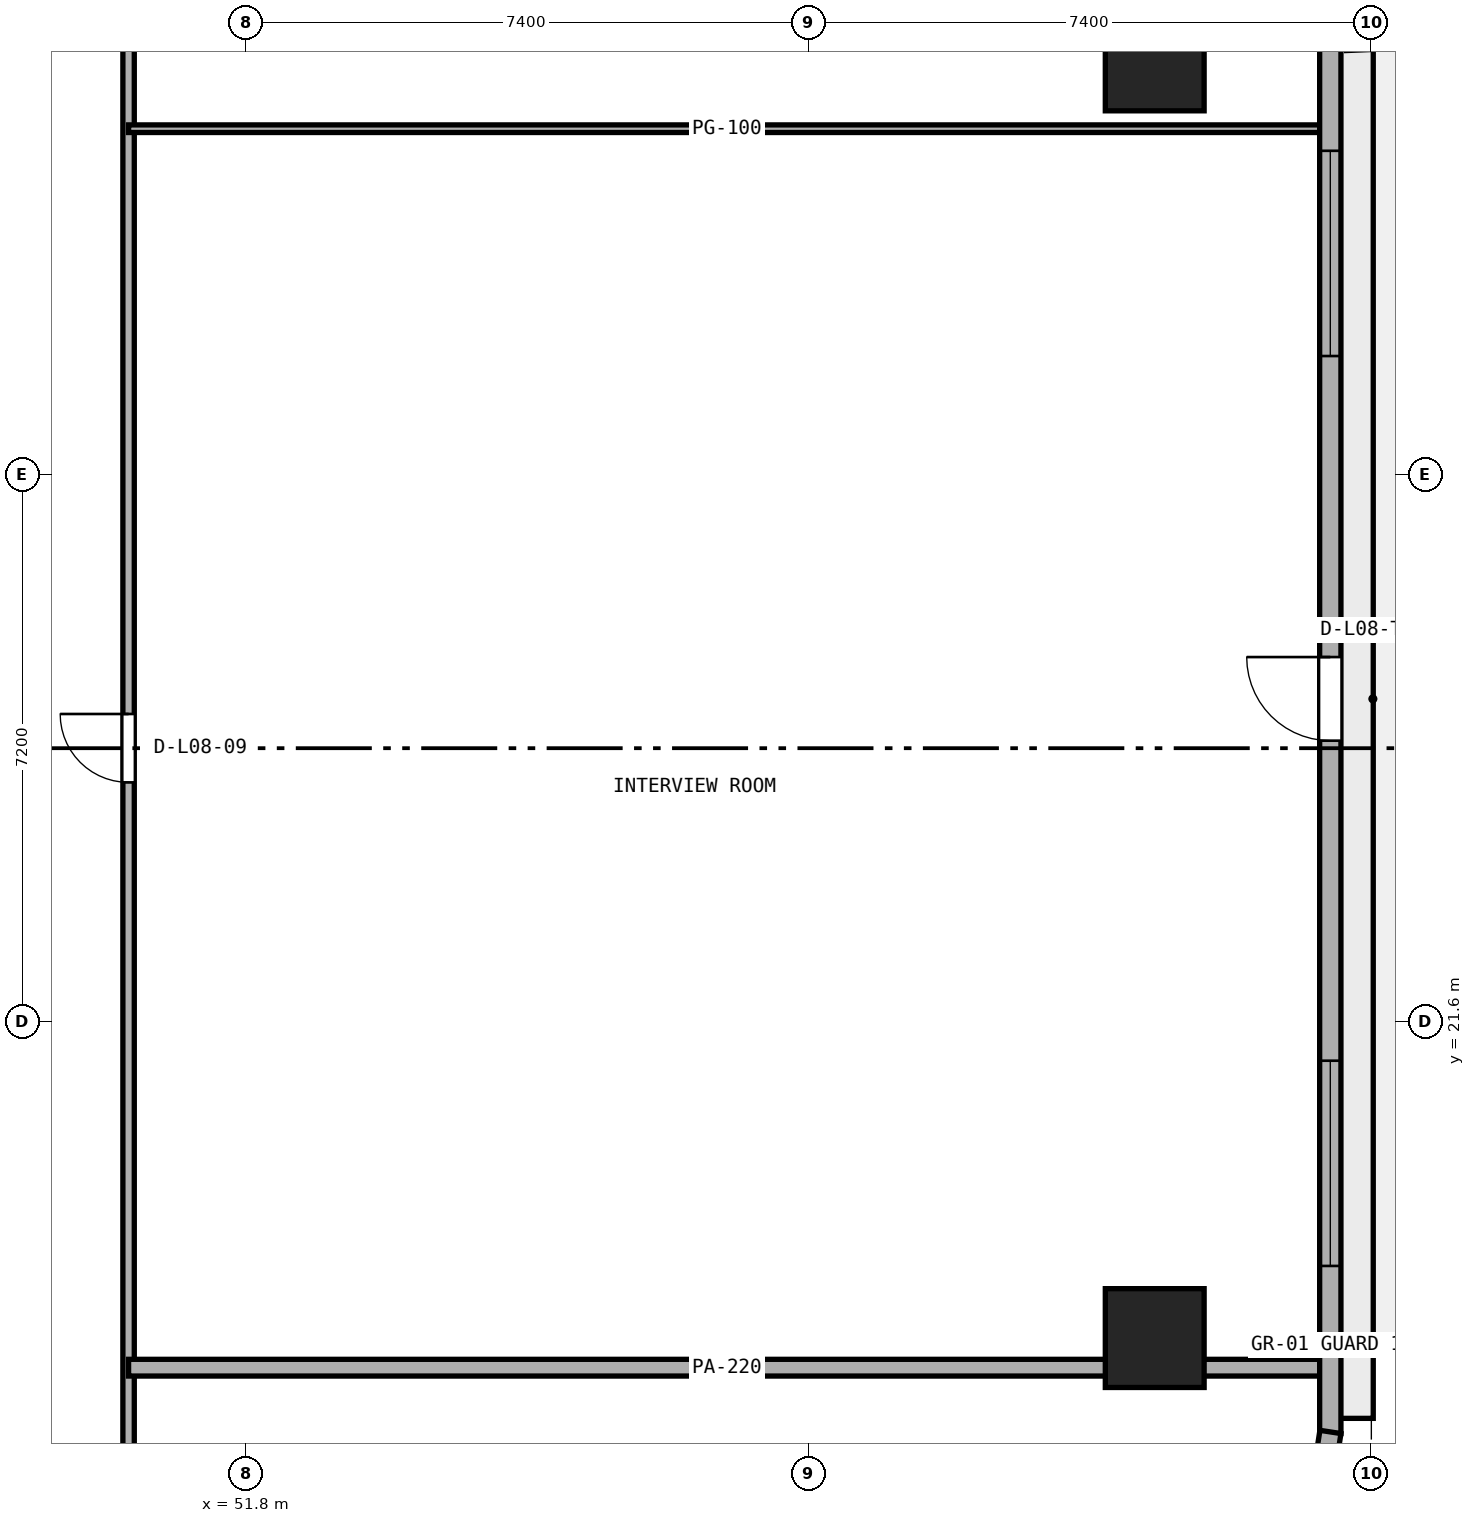
"""IFC4 building model, lengths in metres.
Left out: names, types, materials, properties, quantities, classifications, styles, units other than length and angle.
Written with IfcOpenShell. Run it as: python <this file> out.ifc"""

import sys

from ifc_helpers import new_model, si_unit, direction, frame, frame_2d, origin, origin_2d, place, context, subcontext, project, spatial, rectangle, extrude, element, fill, save


model = new_model("IFC4")
c1 = context("Model", 3, precision=1e-05, world=origin(), true_north=direction((0.0, 1.0)))
c2 = subcontext(c1, "Body", "Model", "MODEL_VIEW")
j1 = project(units=[si_unit("LENGTHUNIT", "METRE"), si_unit("PLANEANGLEUNIT", "RADIAN")], contexts=[c1])
p1 = place(None, origin())
s1 = spatial("IfcSite", under=j1, at=p1, CompositionType="ELEMENT")
p2 = place(p1, origin())
s2 = spatial("IfcBuilding", under=s1, at=p2, CompositionType="ELEMENT")
p3 = place(p2, frame((0.0, 0.0, 36.4)))
s3 = spatial("IfcBuildingStorey", under=s2, at=p3, CompositionType="ELEMENT", Elevation=36.4)
for number, where, z_axis, x_axis in (
    (1, (63.75, 17.44, 0.0), (0.0, 0.0, 1.0), (1.0, 0.0, 0.0)),
    (2, (63.75, 34.235, 0.0), (0.0, 0.0, 1.0), (1.0, 0.0, 0.0)),
):
    element("IfcColumn", number, at=place(p3, frame(where, z_axis=z_axis, x_axis=x_axis)), inside=s3, PredefinedType="COLUMN", context=c2, shape_type="SweptSolid", body=[
        extrude(rectangle(XDim=1.3, YDim=1.3, at=origin_2d()), origin(), (0.0, 0.0, 1.0), 3.8),
    ])
p4 = place(p3, frame((50.25, 15.35, 0.0), z_axis=(0.0, 0.0, 1.0), x_axis=(0.0, 1.0, 0.0)))
e3 = element("IfcWall", 3, at=p4, inside=s3, PredefinedType="PARTITIONING", context=c2, shape_type="SweptSolid", body=[
    extrude(rectangle(XDim=19.7, YDim=0.15, at=frame_2d((9.85, 0.0))), origin(), (0.0, 0.0, 1.0), 3.525),
])
p5 = place(p4, frame((9.4, 0.0, 0.0)))
e4 = element("IfcOpeningElement", 4, at=p5, cuts=e3, PredefinedType="OPENING", context=c2, shape_type="SweptSolid", body=[
    extrude(rectangle(XDim=0.9, YDim=2.1, at=frame_2d((0.45, 1.05))), frame((0.0, 0.085, 0.0), z_axis=(0.0, -1.0, 0.0), x_axis=(1.0, 0.0, 0.0)), (0.0, 0.0, 1.0), 0.17),
])
p6 = place(p3, frame((50.25, 17.05, 0.0), z_axis=(0.0, 0.0, 1.0), x_axis=(1.0, 0.0, 0.0)))
e5 = element("IfcWall", 5, at=p6, inside=s3, PredefinedType="PARTITIONING", context=c2, shape_type="SweptSolid", body=[
    extrude(rectangle(XDim=15.745, YDim=0.22, at=frame_2d((7.873, 0.0))), origin(), (0.0, 0.0, 1.0), 3.525),
])
p7 = place(p3, frame((50.25, 33.35, 0.0), z_axis=(0.0, 0.0, 1.0), x_axis=(1.0, 0.0, 0.0)))
e6 = element("IfcWall", 6, at=p7, inside=s3, PredefinedType="PARTITIONING", context=c2, shape_type="SweptSolid", body=[
    extrude(rectangle(XDim=15.745, YDim=0.1, at=frame_2d((7.873, 0.0))), origin(), (0.0, 0.0, 1.0), 2.908),
])
p8 = place(p3, frame((66.06, 16.183, 0.0), z_axis=(0.0, 0.0, 1.0), x_axis=(0.0, 1.0, 0.0)))
e7 = element("IfcWall", 7, at=p8, inside=s3, PredefinedType="STANDARD", context=c2, shape_type="SweptSolid", body=[
    extrude(rectangle(XDim=19.331, YDim=0.28, at=frame_2d((9.666, 0.0))), origin(), (0.0, 0.0, 1.0), 3.525),
])
p9 = place(p8, frame((9.115, 0.0, 0.0)))
e8 = element("IfcOpeningElement", 8, at=p9, cuts=e7, PredefinedType="OPENING", context=c2, shape_type="SweptSolid", body=[
    extrude(rectangle(XDim=1.1, YDim=2.2, at=frame_2d((0.55, 1.1))), frame((0.0, 0.15, 0.0), z_axis=(0.0, -1.0, 0.0), x_axis=(1.0, 0.0, 0.0)), (0.0, 0.0, 1.0), 0.3),
])
p10 = place(p8, frame((2.205, 0.0, 0.9)))
e9 = element("IfcOpeningElement", 9, at=p10, cuts=e7, PredefinedType="OPENING", context=c2, shape_type="SweptSolid", body=[
    extrude(rectangle(XDim=2.7, YDim=1.75, at=frame_2d((1.35, 0.875))), frame((0.0, 0.15, 0.0), z_axis=(0.0, -1.0, 0.0), x_axis=(1.0, 0.0, 0.0)), (0.0, 0.0, 1.0), 0.3),
])
p11 = place(p8, frame((14.176, 0.0, 0.9)))
e10 = element("IfcOpeningElement", 10, at=p11, cuts=e7, PredefinedType="OPENING", context=c2, shape_type="SweptSolid", body=[
    extrude(rectangle(XDim=2.7, YDim=1.75, at=frame_2d((1.35, 0.875))), frame((0.0, 0.15, 0.0), z_axis=(0.0, -1.0, 0.0), x_axis=(1.0, 0.0, 0.0)), (0.0, 0.0, 1.0), 0.3),
])
p12 = place(p3, frame((65.867, 14.943, 0.0), z_axis=(0.0, 0.0, 1.0), x_axis=(0.152014078361, 0.988378328364, 0.0)))
e11 = element("IfcWall", 11, at=p12, inside=s3, PredefinedType="STANDARD", context=c2, shape_type="SweptSolid", body=[
    extrude(rectangle(XDim=1.277, YDim=0.28, at=frame_2d((0.638, 0.0))), origin(), (0.0, 0.0, 1.0), 3.525),
])
p13 = place(p5, origin())
e12 = element("IfcDoor", 12, at=p13, inside=s3, OperationType="SINGLE_SWING_RIGHT", PredefinedType="DOOR", context=c2, shape_type="SweptSolid", body=[
    extrude(rectangle(XDim=0.9, YDim=2.1, at=frame_2d((0.45, 1.05))), frame((0.0, 0.025, 0.0), z_axis=(0.0, -1.0, 0.0), x_axis=(1.0, 0.0, 0.0)), (0.0, 0.0, 1.0), 0.05),
])
fill(e4, e12)
p14 = place(p9, origin())
e13 = element("IfcDoor", 13, at=p14, inside=s3, OperationType="SINGLE_SWING_RIGHT", PredefinedType="DOOR", context=c2, shape_type="SweptSolid", body=[
    extrude(rectangle(XDim=1.1, YDim=2.2, at=frame_2d((0.55, 1.1))), frame((0.0, 0.025, 0.0), z_axis=(0.0, -1.0, 0.0), x_axis=(1.0, 0.0, 0.0)), (0.0, 0.0, 1.0), 0.05),
])
fill(e8, e13)
p15 = place(p10, origin())
e14 = element("IfcWindow", 14, at=p15, inside=s3, PartitioningType="SINGLE_PANEL", PredefinedType="WINDOW", context=c2, shape_type="SweptSolid", body=[
    extrude(rectangle(XDim=2.7, YDim=1.75, at=frame_2d((1.35, 0.875))), frame((0.0, 0.03, 0.0), z_axis=(0.0, -1.0, 0.0), x_axis=(1.0, 0.0, 0.0)), (0.0, 0.0, 1.0), 0.06),
])
fill(e9, e14)
p16 = place(p11, origin())
e15 = element("IfcWindow", 15, at=p16, inside=s3, PartitioningType="SINGLE_PANEL", PredefinedType="WINDOW", context=c2, shape_type="SweptSolid", body=[
    extrude(rectangle(XDim=2.7, YDim=1.75, at=frame_2d((1.35, 0.875))), frame((0.0, 0.03, 0.0), z_axis=(0.0, -1.0, 0.0), x_axis=(1.0, 0.0, 0.0)), (0.0, 0.0, 1.0), 0.06),
])
fill(e10, e15)
save(model, sys.argv[1])
